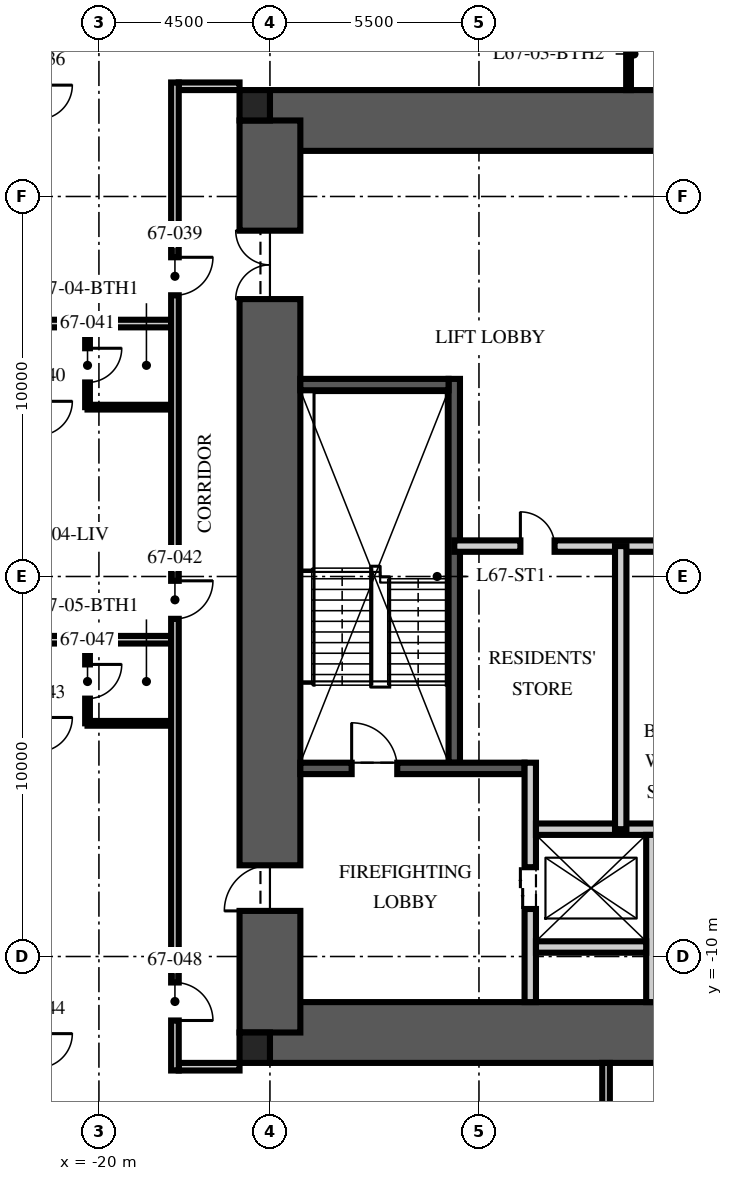
"""IFC4 building model, lengths in metres.
Left out: names, types, materials, properties, quantities, classifications, styles, units other than length and angle.
Written with IfcOpenShell. Run it as: python <this file> out.ifc"""

import sys

from ifc_helpers import new_model, si_unit, direction, frame, frame_2d, origin, origin_2d, place, context, subcontext, project, spatial, rectangle, extrude, element, fill, save


model = new_model("IFC4")
c1 = context("Model", 3, precision=1e-05, world=origin(), true_north=direction((0.0, 1.0)))
c2 = subcontext(c1, "Body", "Model", "MODEL_VIEW")
j1 = project(units=[si_unit("LENGTHUNIT", "METRE"), si_unit("PLANEANGLEUNIT", "RADIAN")], contexts=[c1])
p1 = place(None, origin())
s1 = spatial("IfcSite", under=j1, at=p1, CompositionType="ELEMENT")
p2 = place(p1, origin())
s2 = spatial("IfcBuilding", under=s1, at=p2, CompositionType="ELEMENT")
p3 = place(p2, frame((0.0, 0.0, 267.0)))
s3 = spatial("IfcBuildingStorey", under=s2, at=p3, CompositionType="ELEMENT", Elevation=267.0)
for number, where, z_axis, x_axis in (
    (1, (-15.5, 12.0, -0.25), (0.0, 0.0, 1.0), (1.0, 0.0, 0.0)),
    (2, (-15.5, -12.0, -0.25), (0.0, 0.0, 1.0), (1.0, 0.0, 0.0)),
):
    element("IfcWall", number, at=place(p3, frame(where, z_axis=z_axis, x_axis=x_axis)), inside=s3, PredefinedType="SHEAR", context=c2, shape_type="SweptSolid", body=[
        extrude(rectangle(XDim=31.0, YDim=1.6, at=frame_2d((15.5, 0.0))), origin(), (0.0, 0.0, 1.0), 3.75),
    ])
p4 = place(p3, frame((-15.5, -12.0, -0.25), z_axis=(0.0, 0.0, 1.0), x_axis=(0.0, 1.0, 0.0)))
e3 = element("IfcWall", 3, at=p4, inside=s3, PredefinedType="SHEAR", context=c2, shape_type="SweptSolid", body=[
    extrude(rectangle(XDim=24.0, YDim=1.6, at=frame_2d((12.0, 0.0))), origin(), (0.0, 0.0, 1.0), 3.75),
])
p5 = place(p4, frame((3.2, 0.0, 0.25)))
e4 = element("IfcOpeningElement", 4, at=p5, cuts=e3, PredefinedType="OPENING", context=c2, shape_type="SweptSolid", body=[
    extrude(rectangle(XDim=1.2, YDim=2.1, at=frame_2d((0.6, 1.05))), frame((0.0, 0.81, 0.0), z_axis=(0.0, -1.0, 0.0), x_axis=(1.0, 0.0, 0.0)), (0.0, 0.0, 1.0), 1.62),
])
p6 = place(p4, frame((19.3, 0.0, 0.25)))
e5 = element("IfcOpeningElement", 5, at=p6, cuts=e3, PredefinedType="OPENING", context=c2, shape_type="SweptSolid", body=[
    extrude(rectangle(XDim=1.8, YDim=2.1, at=frame_2d((0.9, 1.05))), frame((0.0, 0.81, 0.0), z_axis=(0.0, -1.0, 0.0), x_axis=(1.0, 0.0, 0.0)), (0.0, 0.0, 1.0), 1.62),
])
for number, where, z_axis, x_axis in (
    (6, (-15.9, 12.4, -0.25), (0.0, 0.0, 1.0), (1.0, 0.0, 0.0)),
    (7, (-15.9, -12.4, -0.25), (0.0, 0.0, 1.0), (1.0, 0.0, 0.0)),
):
    element("IfcColumn", number, at=place(p3, frame(where, z_axis=z_axis, x_axis=x_axis)), inside=s3, PredefinedType="COLUMN", context=c2, shape_type="SweptSolid", body=[
        extrude(rectangle(XDim=0.8, YDim=0.8, at=origin_2d()), origin(), (0.0, 0.0, 1.0), 3.75),
    ])
p7 = place(p3, frame((-10.65, -4.9, 0.0), z_axis=(0.0, 0.0, 1.0), x_axis=(0.0, 1.0, 0.0)))
e8 = element("IfcWall", 8, at=p7, inside=s3, PredefinedType="SOLIDWALL", context=c2, shape_type="SweptSolid", body=[
    extrude(rectangle(XDim=10.1, YDim=0.3, at=frame_2d((5.05, 0.0))), origin(), (0.0, 0.0, 1.0), 3.5),
])
p8 = place(p3, frame((-14.7, -5.05, 0.0), z_axis=(0.0, 0.0, 1.0), x_axis=(1.0, 0.0, 0.0)))
e9 = element("IfcWall", 9, at=p8, inside=s3, PredefinedType="SOLIDWALL", context=c2, shape_type="SweptSolid", body=[
    extrude(rectangle(XDim=5.9, YDim=0.3, at=frame_2d((2.95, 0.0))), origin(), (0.0, 0.0, 1.0), 3.5),
])
p9 = place(p8, frame((1.35, 0.0, 0.0)))
e10 = element("IfcOpeningElement", 10, at=p9, cuts=e9, PredefinedType="OPENING", context=c2, shape_type="SweptSolid", body=[
    extrude(rectangle(XDim=1.2, YDim=2.1, at=frame_2d((0.6, 1.05))), frame((0.0, 0.16, 0.0), z_axis=(0.0, -1.0, 0.0), x_axis=(1.0, 0.0, 0.0)), (0.0, 0.0, 1.0), 0.32),
])
p10 = place(p3, frame((-14.7, 5.05, 0.0), z_axis=(0.0, 0.0, 1.0), x_axis=(1.0, 0.0, 0.0)))
e11 = element("IfcWall", 11, at=p10, inside=s3, PredefinedType="SOLIDWALL", context=c2, shape_type="SweptSolid", body=[
    extrude(rectangle(XDim=3.9, YDim=0.3, at=frame_2d((1.95, 0.0))), origin(), (0.0, 0.0, 1.0), 3.5),
])
p11 = place(p3, frame((-8.65, -11.2, 0.0), z_axis=(0.0, 0.0, 1.0), x_axis=(0.0, 1.0, 0.0)))
e12 = element("IfcWall", 12, at=p11, inside=s3, PredefinedType="PARTITIONING", context=c2, shape_type="SweptSolid", body=[
    extrude(rectangle(XDim=6.3, YDim=0.3, at=frame_2d((3.15, 0.0))), origin(), (0.0, 0.0, 1.0), 3.5),
])
p12 = place(p11, frame((2.45, 0.0, 0.0)))
e13 = element("IfcOpeningElement", 13, at=p12, cuts=e12, PredefinedType="OPENING", context=c2, shape_type="SweptSolid", body=[
    extrude(rectangle(XDim=1.1, YDim=2.1, at=frame_2d((0.55, 1.05))), frame((0.0, 0.16, 0.0), z_axis=(0.0, -1.0, 0.0), x_axis=(1.0, 0.0, 0.0)), (0.0, 0.0, 1.0), 0.32),
])
p13 = place(p3, frame((-8.5, -6.65, 0.0), z_axis=(0.0, 0.0, 1.0), x_axis=(1.0, 0.0, 0.0)))
e14 = element("IfcWall", 14, at=p13, inside=s3, PredefinedType="PARTITIONING", context=c2, shape_type="SweptSolid", body=[
    extrude(rectangle(XDim=17.0, YDim=0.3, at=frame_2d((8.5, 0.0))), origin(), (0.0, 0.0, 1.0), 3.5),
])
p14 = place(p13, frame((7.8, 0.0, 0.0)))
e15 = element("IfcOpeningElement", 15, at=p14, cuts=e14, PredefinedType="OPENING", context=c2, shape_type="SweptSolid", body=[
    extrude(rectangle(XDim=1.3, YDim=2.4, at=frame_2d((0.65, 1.2))), frame((0.0, 0.16, 0.0), z_axis=(0.0, -1.0, 0.0), x_axis=(1.0, 0.0, 0.0)), (0.0, 0.0, 1.0), 0.32),
])
p15 = place(p13, frame((5.65, 0.0, 0.0)))
e16 = element("IfcOpeningElement", 16, at=p15, cuts=e14, PredefinedType="OPENING", context=c2, shape_type="SweptSolid", body=[
    extrude(rectangle(XDim=0.9, YDim=2.1, at=frame_2d((0.45, 1.05))), frame((0.0, 0.16, 0.0), z_axis=(0.0, -1.0, 0.0), x_axis=(1.0, 0.0, 0.0)), (0.0, 0.0, 1.0), 0.32),
])
p16 = place(p13, frame((10.4, 0.0, 0.0)))
e17 = element("IfcOpeningElement", 17, at=p16, cuts=e14, PredefinedType="OPENING", context=c2, shape_type="SweptSolid", body=[
    extrude(rectangle(XDim=0.9, YDim=2.1, at=frame_2d((0.45, 1.05))), frame((0.0, 0.16, 0.0), z_axis=(0.0, -1.0, 0.0), x_axis=(1.0, 0.0, 0.0)), (0.0, 0.0, 1.0), 0.32),
])
p17 = place(p3, frame((-5.45, -11.2, 0.0), z_axis=(0.0, 0.0, 1.0), x_axis=(0.0, 1.0, 0.0)))
e18 = element("IfcWall", 18, at=p17, inside=s3, PredefinedType="PARTITIONING", context=c2, shape_type="SweptSolid", body=[
    extrude(rectangle(XDim=4.4, YDim=0.3, at=frame_2d((2.2, 0.0))), origin(), (0.0, 0.0, 1.0), 3.5),
])
p18 = place(p3, frame((-8.5, -9.75, 0.0), z_axis=(0.0, 0.0, 1.0), x_axis=(1.0, 0.0, 0.0)))
e19 = element("IfcWall", 19, at=p18, inside=s3, PredefinedType="PARTITIONING", context=c2, shape_type="SweptSolid", body=[
    extrude(rectangle(XDim=2.9, YDim=0.3, at=frame_2d((1.45, 0.0))), origin(), (0.0, 0.0, 1.0), 3.5),
])
p19 = place(p3, frame((-10.65, 0.8, 0.0), z_axis=(0.0, 0.0, 1.0), x_axis=(1.0, 0.0, 0.0)))
e20 = element("IfcWall", 20, at=p19, inside=s3, PredefinedType="PARTITIONING", context=c2, shape_type="SweptSolid", body=[
    extrude(rectangle(XDim=21.3, YDim=0.3, at=frame_2d((10.65, 0.0))), origin(), (0.0, 0.0, 1.0), 3.5),
])
p20 = place(p19, frame((10.05, 0.0, 0.0)))
e21 = element("IfcOpeningElement", 21, at=p20, cuts=e20, PredefinedType="OPENING", context=c2, shape_type="SweptSolid", body=[
    extrude(rectangle(XDim=1.2, YDim=2.1, at=frame_2d((0.6, 1.05))), frame((0.0, 0.16, 0.0), z_axis=(0.0, -1.0, 0.0), x_axis=(1.0, 0.0, 0.0)), (0.0, 0.0, 1.0), 0.32),
])
p21 = place(p19, frame((1.74, 0.0, 0.0)))
e22 = element("IfcOpeningElement", 22, at=p21, cuts=e20, PredefinedType="OPENING", context=c2, shape_type="SweptSolid", body=[
    extrude(rectangle(XDim=0.9, YDim=2.1, at=frame_2d((0.45, 1.05))), frame((0.0, 0.16, 0.0), z_axis=(0.0, -1.0, 0.0), x_axis=(1.0, 0.0, 0.0)), (0.0, 0.0, 1.0), 0.32),
])
p22 = place(p3, frame((-6.27, -6.65, 0.0), z_axis=(0.0, 0.0, 1.0), x_axis=(0.0, 1.0, 0.0)))
e23 = element("IfcWall", 23, at=p22, inside=s3, PredefinedType="PARTITIONING", context=c2, shape_type="SweptSolid", body=[
    extrude(rectangle(XDim=7.45, YDim=0.3, at=frame_2d((3.725, 0.0))), origin(), (0.0, 0.0, 1.0), 3.5),
])
for number, where, z_axis, x_axis in (
    (24, (-16.3, 12.9, 0.0), (0.0, 0.0, 1.0), (-1.0, 0.0, 0.0)),
    (25, (-16.3, -12.9, 0.0), (0.0, 0.0, 1.0), (-1.0, 0.0, 0.0)),
):
    element("IfcWall", number, at=place(p3, frame(where, z_axis=z_axis, x_axis=x_axis)), inside=s3, PredefinedType="PARTITIONING", context=c2, shape_type="SweptSolid", body=[
        extrude(rectangle(XDim=1.6, YDim=0.2, at=frame_2d((0.8, 0.0))), origin(), (0.0, 0.0, 1.0), 2.3),
    ])
for number, where, z_axis, x_axis in (
    (26, (-18.1, 6.656, 0.0), (0.0, 0.0, 1.0), (-1.0, 0.0, 0.0)),
    (27, (-18.1, -1.664, 0.0), (0.0, 0.0, 1.0), (-1.0, 0.0, 0.0)),
):
    element("IfcWall", number, at=place(p3, frame(where, z_axis=z_axis, x_axis=x_axis)), inside=s3, PredefinedType="PARTITIONING", context=c2, shape_type="SweptSolid", body=[
        extrude(rectangle(XDim=7.35, YDim=0.2, at=frame_2d((3.675, 0.0))), origin(), (0.0, 0.0, 1.0), 2.91),
    ])
p23 = place(p3, frame((-6.656, -12.8, 0.0), z_axis=(0.0, 0.0, 1.0), x_axis=(0.0, -1.0, 0.0)))
e28 = element("IfcWall", 28, at=p23, inside=s3, PredefinedType="PARTITIONING", context=c2, shape_type="SweptSolid", body=[
    extrude(rectangle(XDim=12.65, YDim=0.2, at=frame_2d((6.325, 0.0))), origin(), (0.0, 0.0, 1.0), 2.91),
])
p24 = place(p3, frame((-6.064, 12.8, 0.0), z_axis=(0.0, 0.0, 1.0), x_axis=(0.0, 1.0, 0.0)))
e29 = element("IfcWall", 29, at=p24, inside=s3, PredefinedType="PARTITIONING", context=c2, shape_type="SweptSolid", body=[
    extrude(rectangle(XDim=2.8, YDim=0.125, at=frame_2d((1.4, 0.0))), origin(), (0.0, 0.0, 1.0), 3.5),
])
p25 = place(p3, frame((-20.3, 6.656, 0.0), z_axis=(0.0, 0.0, 1.0), x_axis=(0.0, -1.0, 0.0)))
e30 = element("IfcWall", 30, at=p25, inside=s3, PredefinedType="PARTITIONING", context=c2, shape_type="SweptSolid", body=[
    extrude(rectangle(XDim=2.2, YDim=0.125, at=frame_2d((1.1, 0.0))), origin(), (0.0, 0.0, 1.0), 3.5),
])
p26 = place(p25, frame((0.65, 0.0, 0.0)))
e31 = element("IfcOpeningElement", 31, at=p26, cuts=e30, PredefinedType="OPENING", context=c2, shape_type="SweptSolid", body=[
    extrude(rectangle(XDim=0.9, YDim=2.1, at=frame_2d((0.45, 1.05))), frame((0.0, 0.073, 0.0), z_axis=(0.0, -1.0, 0.0), x_axis=(1.0, 0.0, 0.0)), (0.0, 0.0, 1.0), 0.145),
])
p27 = place(p3, frame((-18.1, 4.456, 0.0), z_axis=(0.0, 0.0, 1.0), x_axis=(-1.0, 0.0, 0.0)))
e32 = element("IfcWall", 32, at=p27, inside=s3, PredefinedType="PARTITIONING", context=c2, shape_type="SweptSolid", body=[
    extrude(rectangle(XDim=2.2, YDim=0.125, at=frame_2d((1.1, 0.0))), origin(), (0.0, 0.0, 1.0), 3.5),
])
p28 = place(p3, frame((-20.3, -1.664, 0.0), z_axis=(0.0, 0.0, 1.0), x_axis=(0.0, -1.0, 0.0)))
e33 = element("IfcWall", 33, at=p28, inside=s3, PredefinedType="PARTITIONING", context=c2, shape_type="SweptSolid", body=[
    extrude(rectangle(XDim=2.2, YDim=0.125, at=frame_2d((1.1, 0.0))), origin(), (0.0, 0.0, 1.0), 3.5),
])
p29 = place(p28, frame((0.65, 0.0, 0.0)))
e34 = element("IfcOpeningElement", 34, at=p29, cuts=e33, PredefinedType="OPENING", context=c2, shape_type="SweptSolid", body=[
    extrude(rectangle(XDim=0.9, YDim=2.1, at=frame_2d((0.45, 1.05))), frame((0.0, 0.073, 0.0), z_axis=(0.0, -1.0, 0.0), x_axis=(1.0, 0.0, 0.0)), (0.0, 0.0, 1.0), 0.145),
])
p30 = place(p3, frame((-18.1, -3.864, 0.0), z_axis=(0.0, 0.0, 1.0), x_axis=(-1.0, 0.0, 0.0)))
e35 = element("IfcWall", 35, at=p30, inside=s3, PredefinedType="PARTITIONING", context=c2, shape_type="SweptSolid", body=[
    extrude(rectangle(XDim=2.2, YDim=0.125, at=frame_2d((1.1, 0.0))), origin(), (0.0, 0.0, 1.0), 3.5),
])
p31 = place(p3, frame((-18.0, 13.0, 0.0), z_axis=(0.0, 0.0, 1.0), x_axis=(0.0, -1.0, 0.0)))
e36 = element("IfcWall", 36, at=p31, inside=s3, PredefinedType="PARTITIONING", context=c2, shape_type="SweptSolid", body=[
    extrude(rectangle(XDim=26.0, YDim=0.2, at=frame_2d((13.0, 0.0))), origin(), (0.0, 0.0, 1.0), 2.6),
])
p32 = place(p31, frame((4.6, 0.0, 0.0)))
e37 = element("IfcOpeningElement", 37, at=p32, cuts=e36, PredefinedType="OPENING", context=c2, shape_type="SweptSolid", body=[
    extrude(rectangle(XDim=1.0, YDim=2.2, at=frame_2d((0.5, 1.1))), frame((0.0, 0.11, 0.0), z_axis=(0.0, -1.0, 0.0), x_axis=(1.0, 0.0, 0.0)), (0.0, 0.0, 1.0), 0.22),
])
p33 = place(p31, frame((13.114, 0.0, 0.0)))
e38 = element("IfcOpeningElement", 38, at=p33, cuts=e36, PredefinedType="OPENING", context=c2, shape_type="SweptSolid", body=[
    extrude(rectangle(XDim=1.0, YDim=2.2, at=frame_2d((0.5, 1.1))), frame((0.0, 0.11, 0.0), z_axis=(0.0, -1.0, 0.0), x_axis=(1.0, 0.0, 0.0)), (0.0, 0.0, 1.0), 0.22),
])
p34 = place(p31, frame((23.684, 0.0, 0.0)))
e39 = element("IfcOpeningElement", 39, at=p34, cuts=e36, PredefinedType="OPENING", context=c2, shape_type="SweptSolid", body=[
    extrude(rectangle(XDim=1.0, YDim=2.2, at=frame_2d((0.5, 1.1))), frame((0.0, 0.11, 0.0), z_axis=(0.0, -1.0, 0.0), x_axis=(1.0, 0.0, 0.0)), (0.0, 0.0, 1.0), 0.22),
])
p35 = place(p9, origin())
e40 = element("IfcDoor", 40, at=p35, inside=s3, OperationType="SINGLE_SWING_LEFT", PredefinedType="DOOR", context=c2, shape_type="SweptSolid", body=[
    extrude(rectangle(XDim=1.2, YDim=2.1, at=frame_2d((0.6, 1.05))), frame((0.0, 0.025, 0.0), z_axis=(0.0, -1.0, 0.0), x_axis=(1.0, 0.0, 0.0)), (0.0, 0.0, 1.0), 0.05),
])
fill(e10, e40)
p36 = place(p5, origin())
e41 = element("IfcDoor", 41, at=p36, inside=s3, OperationType="SINGLE_SWING_LEFT", PredefinedType="DOOR", context=c2, shape_type="SweptSolid", body=[
    extrude(rectangle(XDim=1.2, YDim=2.1, at=frame_2d((0.6, 1.05))), frame((0.0, 0.025, 0.0), z_axis=(0.0, -1.0, 0.0), x_axis=(1.0, 0.0, 0.0)), (0.0, 0.0, 1.0), 0.05),
])
fill(e4, e41)
p37 = place(p6, origin())
e42 = element("IfcDoor", 42, at=p37, inside=s3, OperationType="DOUBLE_DOOR_SINGLE_SWING", PredefinedType="DOOR", context=c2, shape_type="SweptSolid", body=[
    extrude(rectangle(XDim=1.8, YDim=2.1, at=frame_2d((0.9, 1.05))), frame((0.0, 0.025, 0.0), z_axis=(0.0, -1.0, 0.0), x_axis=(1.0, 0.0, 0.0)), (0.0, 0.0, 1.0), 0.05),
])
fill(e5, e42)
p38 = place(p12, origin())
e43 = element("IfcDoor", 43, at=p38, inside=s3, OperationType="DOUBLE_DOOR_SLIDING", PredefinedType="DOOR", context=c2, shape_type="SweptSolid", body=[
    extrude(rectangle(XDim=1.1, YDim=2.1, at=frame_2d((0.55, 1.05))), frame((0.0, 0.025, 0.0), z_axis=(0.0, -1.0, 0.0), x_axis=(1.0, 0.0, 0.0)), (0.0, 0.0, 1.0), 0.05),
])
fill(e13, e43)
p39 = place(p21, origin())
e44 = element("IfcDoor", 44, at=p39, inside=s3, OperationType="SINGLE_SWING_LEFT", PredefinedType="DOOR", context=c2, shape_type="SweptSolid", body=[
    extrude(rectangle(XDim=0.9, YDim=2.1, at=frame_2d((0.45, 1.05))), frame((0.0, 0.025, 0.0), z_axis=(0.0, -1.0, 0.0), x_axis=(1.0, 0.0, 0.0)), (0.0, 0.0, 1.0), 0.05),
])
fill(e22, e44)
p40 = place(p32, origin())
e45 = element("IfcDoor", 45, at=p40, inside=s3, OperationType="SINGLE_SWING_LEFT", PredefinedType="DOOR", context=c2, shape_type="SweptSolid", body=[
    extrude(rectangle(XDim=1.0, YDim=2.2, at=frame_2d((0.5, 1.1))), frame((0.0, 0.025, 0.0), z_axis=(0.0, -1.0, 0.0), x_axis=(1.0, 0.0, 0.0)), (0.0, 0.0, 1.0), 0.05),
])
fill(e37, e45)
p41 = place(p26, origin())
e46 = element("IfcDoor", 46, at=p41, inside=s3, OperationType="SINGLE_SWING_LEFT", PredefinedType="DOOR", context=c2, shape_type="SweptSolid", body=[
    extrude(rectangle(XDim=0.9, YDim=2.1, at=frame_2d((0.45, 1.05))), frame((0.0, 0.025, 0.0), z_axis=(0.0, -1.0, 0.0), x_axis=(1.0, 0.0, 0.0)), (0.0, 0.0, 1.0), 0.05),
])
fill(e31, e46)
p42 = place(p33, origin())
e47 = element("IfcDoor", 47, at=p42, inside=s3, OperationType="SINGLE_SWING_LEFT", PredefinedType="DOOR", context=c2, shape_type="SweptSolid", body=[
    extrude(rectangle(XDim=1.0, YDim=2.2, at=frame_2d((0.5, 1.1))), frame((0.0, 0.025, 0.0), z_axis=(0.0, -1.0, 0.0), x_axis=(1.0, 0.0, 0.0)), (0.0, 0.0, 1.0), 0.05),
])
fill(e38, e47)
p43 = place(p29, origin())
e48 = element("IfcDoor", 48, at=p43, inside=s3, OperationType="SINGLE_SWING_LEFT", PredefinedType="DOOR", context=c2, shape_type="SweptSolid", body=[
    extrude(rectangle(XDim=0.9, YDim=2.1, at=frame_2d((0.45, 1.05))), frame((0.0, 0.025, 0.0), z_axis=(0.0, -1.0, 0.0), x_axis=(1.0, 0.0, 0.0)), (0.0, 0.0, 1.0), 0.05),
])
fill(e34, e48)
p44 = place(p34, origin())
e49 = element("IfcDoor", 49, at=p44, inside=s3, OperationType="SINGLE_SWING_RIGHT", PredefinedType="DOOR", context=c2, shape_type="SweptSolid", body=[
    extrude(rectangle(XDim=1.0, YDim=2.2, at=frame_2d((0.5, 1.1))), frame((0.0, 0.025, 0.0), z_axis=(0.0, -1.0, 0.0), x_axis=(1.0, 0.0, 0.0)), (0.0, 0.0, 1.0), 0.05),
])
fill(e39, e49)
save(model, sys.argv[1])
